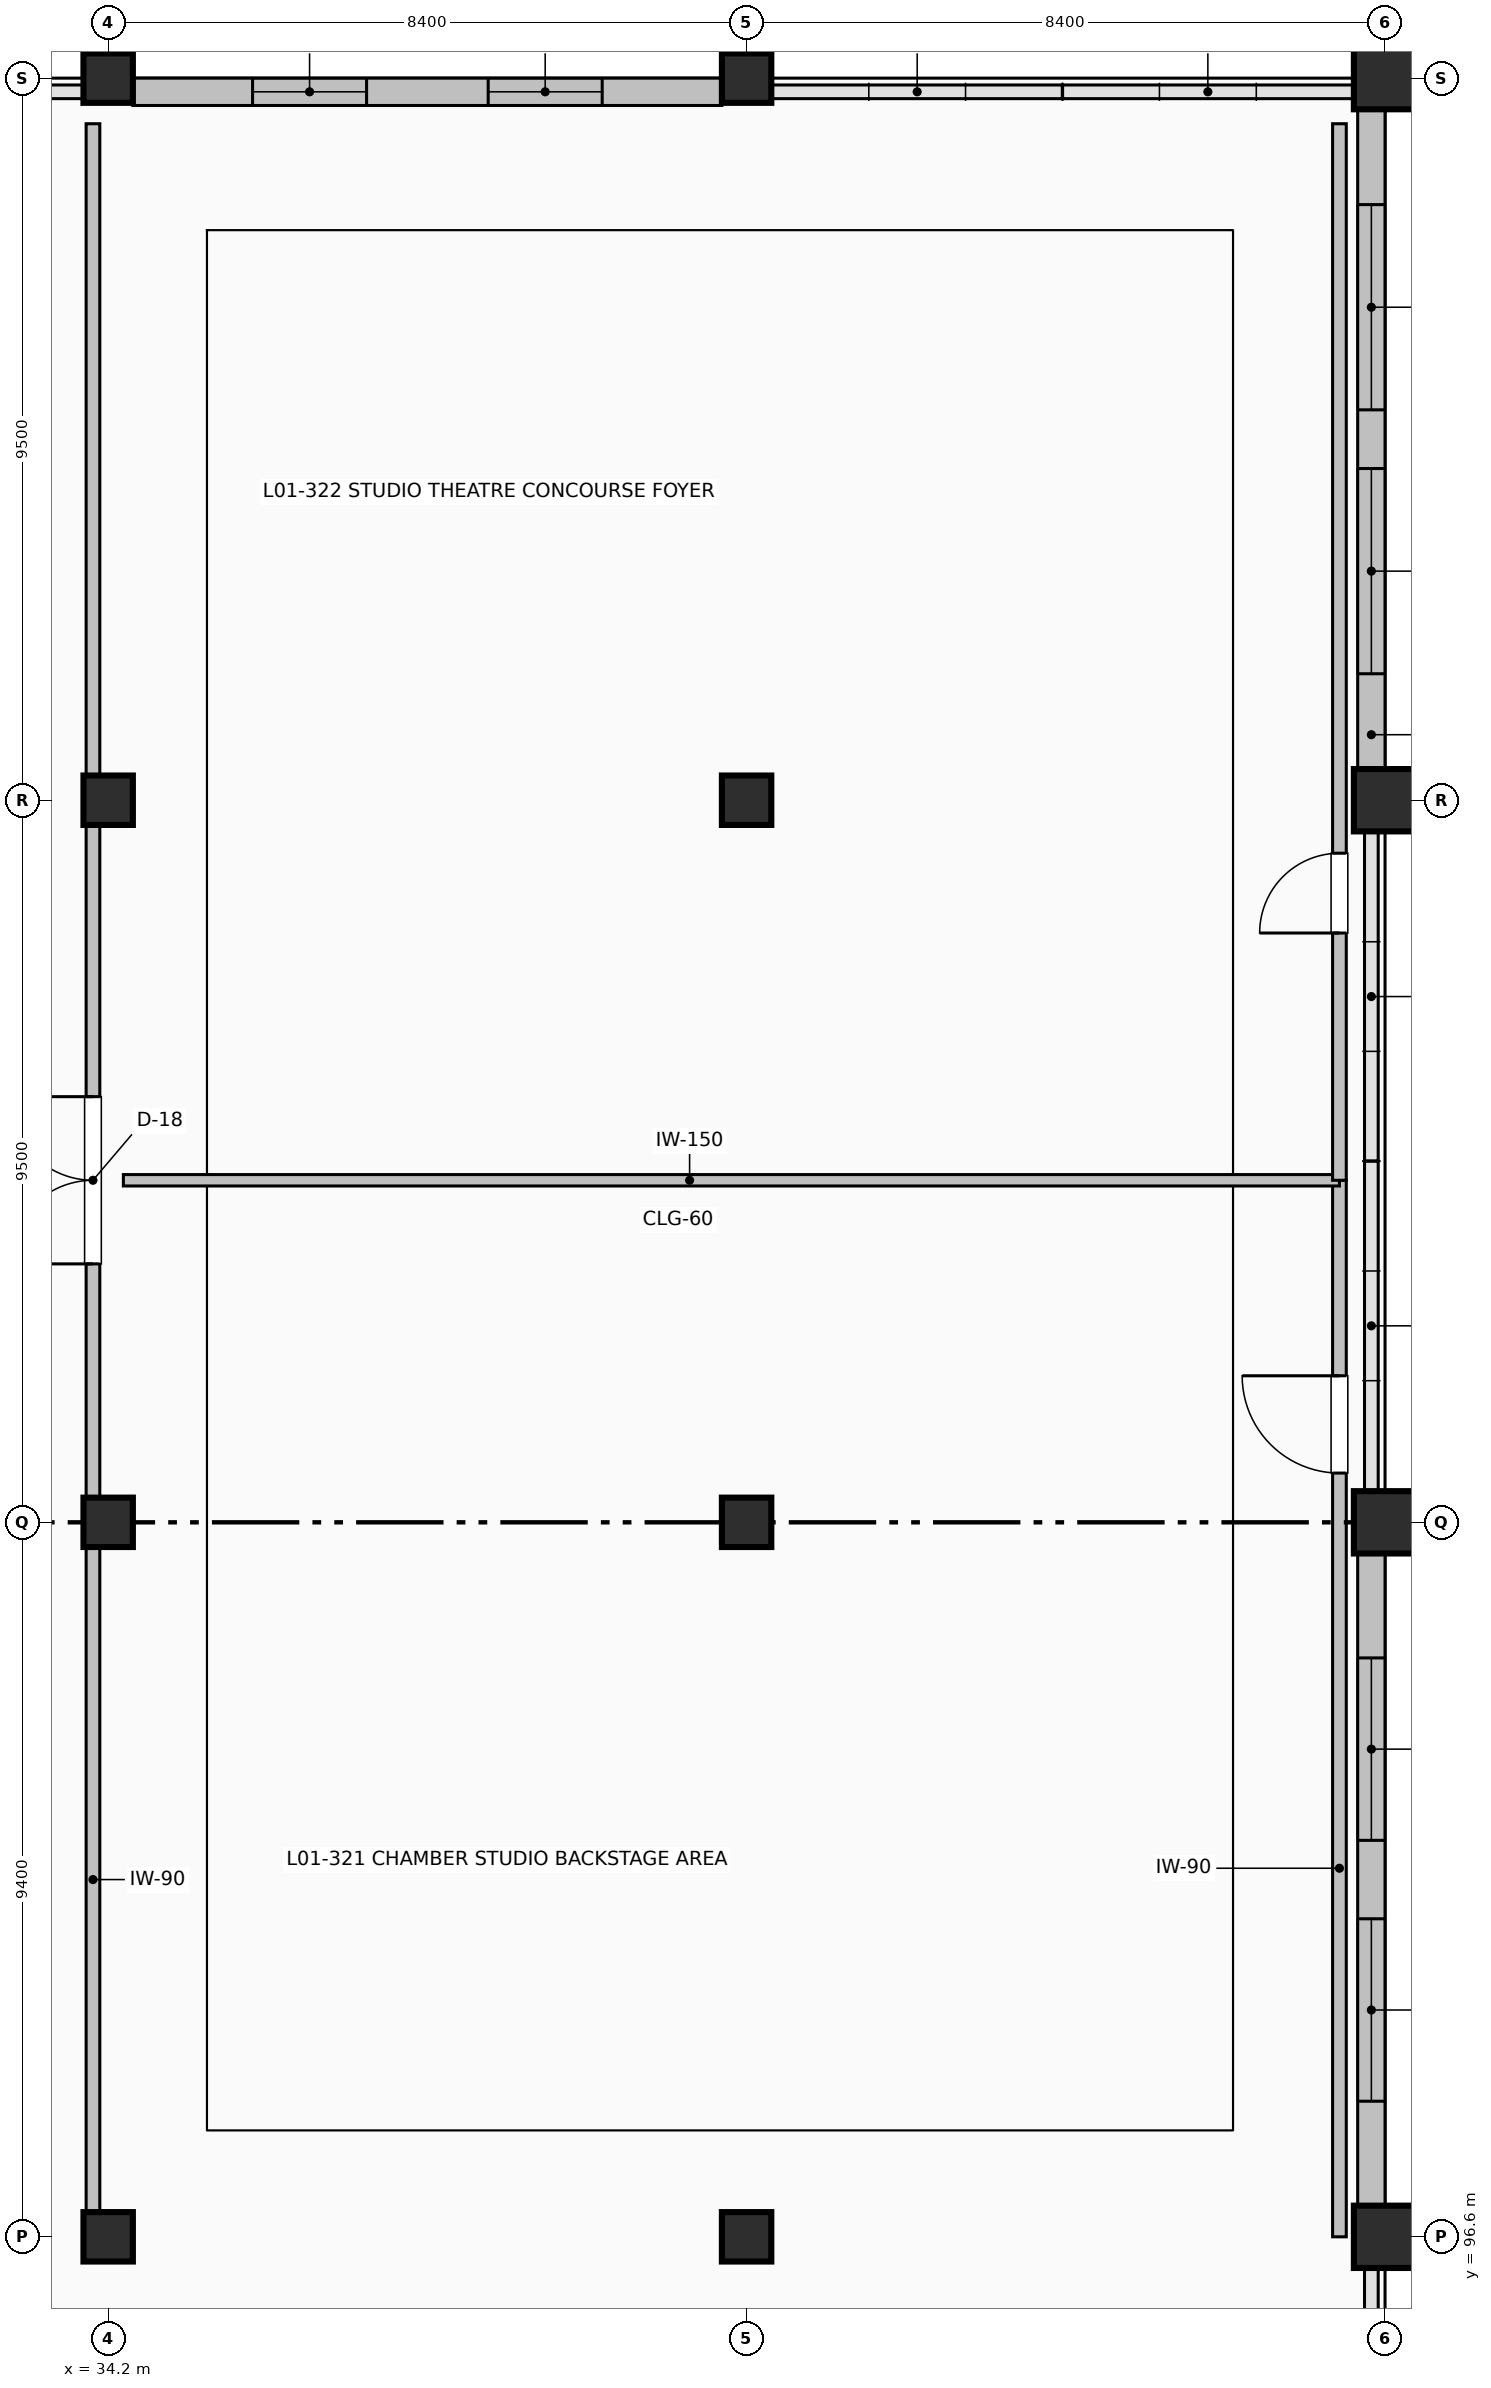
"""IFC4 building model, lengths in metres.
Left out: names, types, materials, properties, quantities, classifications, styles, units other than length and angle.
Written with IfcOpenShell. Run it as: python <this file> out.ifc"""

import sys

from ifc_helpers import new_model, si_unit, direction, frame, frame_2d, origin, origin_2d, place, context, subcontext, project, spatial, rectangle, extrude, element, fill, save


model = new_model("IFC4")
c1 = context("Model", 3, precision=1e-05, world=origin(), true_north=direction((0.0, 1.0)))
c2 = subcontext(c1, "Body", "Model", "MODEL_VIEW")
j1 = project(units=[si_unit("LENGTHUNIT", "METRE"), si_unit("PLANEANGLEUNIT", "RADIAN")], contexts=[c1])
p1 = place(None, origin())
s1 = spatial("IfcSite", under=j1, at=p1, CompositionType="ELEMENT")
p2 = place(p1, origin())
s2 = spatial("IfcBuilding", under=s1, at=p2, CompositionType="ELEMENT")
p3 = place(p2, frame((0.0, 0.0, 5.4)))
s3 = spatial("IfcBuildingStorey", under=s2, at=p3, CompositionType="ELEMENT", Elevation=5.4)
for number, where, z_axis, x_axis in (
    (1, (34.2, 96.6, 0.0), (0.0, 0.0, 1.0), (1.0, 0.0, 0.0)),
    (2, (34.2, 106.0, 0.0), (0.0, 0.0, 1.0), (1.0, 0.0, 0.0)),
    (3, (34.2, 115.5, 0.0), (0.0, 0.0, 1.0), (1.0, 0.0, 0.0)),
    (4, (34.2, 125.0, 0.0), (0.0, 0.0, 1.0), (1.0, 0.0, 0.0)),
    (5, (42.6, 96.6, 0.0), (0.0, 0.0, 1.0), (1.0, 0.0, 0.0)),
    (6, (42.6, 106.0, 0.0), (0.0, 0.0, 1.0), (1.0, 0.0, 0.0)),
    (7, (42.6, 115.5, 0.0), (0.0, 0.0, 1.0), (1.0, 0.0, 0.0)),
    (8, (42.6, 125.0, 0.0), (0.0, 0.0, 1.0), (1.0, 0.0, 0.0)),
):
    element("IfcColumn", number, at=place(p3, frame(where, z_axis=z_axis, x_axis=x_axis)), inside=s3, PredefinedType="COLUMN", context=c2, shape_type="SweptSolid", body=[
        extrude(rectangle(XDim=0.65, YDim=0.65, at=origin_2d()), origin(), (0.0, 0.0, 1.0), 4.8),
    ])
for number, where, z_axis, x_axis in (
    (9, (51.0, 96.6, 0.0), (0.0, 0.0, 1.0), (1.0, 0.0, 0.0)),
    (10, (51.0, 106.0, 0.0), (0.0, 0.0, 1.0), (1.0, 0.0, 0.0)),
    (11, (51.0, 115.5, 0.0), (0.0, 0.0, 1.0), (1.0, 0.0, 0.0)),
    (12, (51.0, 125.0, 0.0), (0.0, 0.0, 1.0), (1.0, 0.0, 0.0)),
):
    element("IfcColumn", number, at=place(p3, frame(where, z_axis=z_axis, x_axis=x_axis)), inside=s3, PredefinedType="COLUMN", context=c2, shape_type="SweptSolid", body=[
        extrude(rectangle(XDim=0.82, YDim=0.82, at=origin_2d()), origin(), (0.0, 0.0, 1.0), 4.8),
    ])
p4 = place(p3, frame((50.82, 124.59, 0.0), z_axis=(0.0, 0.0, 1.0), x_axis=(0.0, -1.0, 0.0)))
e13 = element("IfcWall", 13, at=p4, inside=s3, PredefinedType="SOLIDWALL", context=c2, shape_type="SweptSolid", body=[
    extrude(rectangle(XDim=8.68, YDim=0.36, at=frame_2d((4.34, 0.0))), origin(), (0.0, 0.0, 1.0), 3.592),
])
p5 = place(p4, frame((1.254, 0.0, 0.9)))
e14 = element("IfcOpeningElement", 14, at=p5, cuts=e13, PredefinedType="OPENING", context=c2, shape_type="SweptSolid", body=[
    extrude(rectangle(XDim=2.7, YDim=2.1, at=frame_2d((1.35, 1.05))), frame((0.0, 0.19, 0.0), z_axis=(0.0, -1.0, 0.0), x_axis=(1.0, 0.0, 0.0)), (0.0, 0.0, 1.0), 0.38),
])
p6 = place(p4, frame((4.726, 0.0, 0.9)))
e15 = element("IfcOpeningElement", 15, at=p6, cuts=e13, PredefinedType="OPENING", context=c2, shape_type="SweptSolid", body=[
    extrude(rectangle(XDim=2.7, YDim=2.1, at=frame_2d((1.35, 1.05))), frame((0.0, 0.19, 0.0), z_axis=(0.0, -1.0, 0.0), x_axis=(1.0, 0.0, 0.0)), (0.0, 0.0, 1.0), 0.38),
])
p7 = place(p3, frame((50.82, 105.59, 0.0), z_axis=(0.0, 0.0, 1.0), x_axis=(0.0, -1.0, 0.0)))
e16 = element("IfcWall", 16, at=p7, inside=s3, PredefinedType="SOLIDWALL", context=c2, shape_type="SweptSolid", body=[
    extrude(rectangle(XDim=8.58, YDim=0.36, at=frame_2d((4.29, 0.0))), origin(), (0.0, 0.0, 1.0), 3.592),
])
p8 = place(p7, frame((1.374, 0.0, 0.9)))
e17 = element("IfcOpeningElement", 17, at=p8, cuts=e16, PredefinedType="OPENING", context=c2, shape_type="SweptSolid", body=[
    extrude(rectangle(XDim=2.4, YDim=2.1, at=frame_2d((1.2, 1.05))), frame((0.0, 0.19, 0.0), z_axis=(0.0, -1.0, 0.0), x_axis=(1.0, 0.0, 0.0)), (0.0, 0.0, 1.0), 0.38),
])
p9 = place(p7, frame((4.806, 0.0, 0.9)))
e18 = element("IfcOpeningElement", 18, at=p9, cuts=e16, PredefinedType="OPENING", context=c2, shape_type="SweptSolid", body=[
    extrude(rectangle(XDim=2.4, YDim=2.1, at=frame_2d((1.2, 1.05))), frame((0.0, 0.19, 0.0), z_axis=(0.0, -1.0, 0.0), x_axis=(1.0, 0.0, 0.0)), (0.0, 0.0, 1.0), 0.38),
])
p10 = place(p3, frame((34.525, 124.82, 0.0), z_axis=(0.0, 0.0, 1.0), x_axis=(1.0, 0.0, 0.0)))
e19 = element("IfcWall", 19, at=p10, inside=s3, PredefinedType="SOLIDWALL", context=c2, shape_type="SweptSolid", body=[
    extrude(rectangle(XDim=7.75, YDim=0.36, at=frame_2d((3.875, 0.0))), origin(), (0.0, 0.0, 1.0), 3.592),
])
p11 = place(p10, frame((1.575, 0.0, 0.9)))
e20 = element("IfcOpeningElement", 20, at=p11, cuts=e19, PredefinedType="OPENING", context=c2, shape_type="SweptSolid", body=[
    extrude(rectangle(XDim=1.5, YDim=2.1, at=frame_2d((0.75, 1.05))), frame((0.0, 0.19, 0.0), z_axis=(0.0, -1.0, 0.0), x_axis=(1.0, 0.0, 0.0)), (0.0, 0.0, 1.0), 0.38),
])
p12 = place(p10, frame((4.675, 0.0, 0.9)))
e21 = element("IfcOpeningElement", 21, at=p12, cuts=e19, PredefinedType="OPENING", context=c2, shape_type="SweptSolid", body=[
    extrude(rectangle(XDim=1.5, YDim=2.1, at=frame_2d((0.75, 1.05))), frame((0.0, 0.19, 0.0), z_axis=(0.0, -1.0, 0.0), x_axis=(1.0, 0.0, 0.0)), (0.0, 0.0, 1.0), 0.38),
])
p13 = place(p3, frame((34.0, 96.925, 0.0), z_axis=(0.0, 0.0, 1.0), x_axis=(0.0, 1.0, 0.0)))
e22 = element("IfcWall", 22, at=p13, inside=s3, PredefinedType="PARTITIONING", context=c2, shape_type="SweptSolid", body=[
    extrude(rectangle(XDim=8.75, YDim=0.18, at=frame_2d((4.375, 0.0))), origin(), (0.0, 0.0, 1.0), 3.592),
])
p14 = place(p3, frame((34.0, 106.325, 0.0), z_axis=(0.0, 0.0, 1.0), x_axis=(0.0, 1.0, 0.0)))
e23 = element("IfcWall", 23, at=p14, inside=s3, PredefinedType="PARTITIONING", context=c2, shape_type="SweptSolid", body=[
    extrude(rectangle(XDim=8.85, YDim=0.18, at=frame_2d((4.425, 0.0))), origin(), (0.0, 0.0, 1.0), 3.592),
])
p15 = place(p14, frame((3.075, 0.0, 0.0)))
e24 = element("IfcOpeningElement", 24, at=p15, cuts=e23, PredefinedType="OPENING", context=c2, shape_type="SweptSolid", body=[
    extrude(rectangle(XDim=2.2, YDim=2.32, at=frame_2d((1.1, 1.16))), frame((0.0, 0.1, 0.0), z_axis=(0.0, -1.0, 0.0), x_axis=(1.0, 0.0, 0.0)), (0.0, 0.0, 1.0), 0.2),
])
p16 = place(p3, frame((34.0, 115.825, 0.0), z_axis=(0.0, 0.0, 1.0), x_axis=(0.0, 1.0, 0.0)))
e25 = element("IfcWall", 25, at=p16, inside=s3, PredefinedType="PARTITIONING", context=c2, shape_type="SweptSolid", body=[
    extrude(rectangle(XDim=8.575, YDim=0.18, at=frame_2d((4.288, 0.0))), origin(), (0.0, 0.0, 1.0), 3.592),
])
p17 = place(p3, frame((50.4, 96.6, 0.0), z_axis=(0.0, 0.0, 1.0), x_axis=(0.0, 1.0, 0.0)))
e26 = element("IfcWall", 26, at=p17, inside=s3, PredefinedType="PARTITIONING", context=c2, shape_type="SweptSolid", body=[
    extrude(rectangle(XDim=13.9, YDim=0.18, at=frame_2d((6.95, 0.0))), origin(), (0.0, 0.0, 1.0), 4.492),
])
p18 = place(p17, frame((10.048, 0.0, 0.0)))
e27 = element("IfcOpeningElement", 27, at=p18, cuts=e26, PredefinedType="OPENING", context=c2, shape_type="SweptSolid", body=[
    extrude(rectangle(XDim=1.28, YDim=2.14, at=frame_2d((0.64, 1.07))), frame((0.0, 0.1, 0.0), z_axis=(0.0, -1.0, 0.0), x_axis=(1.0, 0.0, 0.0)), (0.0, 0.0, 1.0), 0.2),
])
p19 = place(p3, frame((34.4, 110.5, 0.0), z_axis=(0.0, 0.0, 1.0), x_axis=(1.0, 0.0, 0.0)))
e28 = element("IfcWall", 28, at=p19, inside=s3, PredefinedType="PARTITIONING", context=c2, shape_type="SweptSolid", body=[
    extrude(rectangle(XDim=16.0, YDim=0.15, at=frame_2d((8.0, 0.0))), origin(), (0.0, 0.0, 1.0), 4.492),
])
p20 = place(p3, frame((50.4, 110.5, 0.0), z_axis=(0.0, 0.0, 1.0), x_axis=(0.0, 1.0, 0.0)))
e29 = element("IfcWall", 29, at=p20, inside=s3, PredefinedType="PARTITIONING", context=c2, shape_type="SweptSolid", body=[
    extrude(rectangle(XDim=13.9, YDim=0.18, at=frame_2d((6.95, 0.0))), origin(), (0.0, 0.0, 1.0), 4.492),
])
p21 = place(p20, frame((3.253, 0.0, 0.0)))
e30 = element("IfcOpeningElement", 30, at=p21, cuts=e29, PredefinedType="OPENING", context=c2, shape_type="SweptSolid", body=[
    extrude(rectangle(XDim=1.05, YDim=2.1, at=frame_2d((0.525, 1.05))), frame((0.0, 0.1, 0.0), z_axis=(0.0, -1.0, 0.0), x_axis=(1.0, 0.0, 0.0)), (0.0, 0.0, 1.0), 0.2),
])
p22 = place(p5, origin())
e31 = element("IfcWindow", 31, at=p22, inside=s3, PartitioningType="SINGLE_PANEL", PredefinedType="WINDOW", context=c2, shape_type="SweptSolid", body=[
    extrude(rectangle(XDim=2.7, YDim=2.1, at=frame_2d((1.35, 1.05))), frame((0.0, 0.03, 0.0), z_axis=(0.0, -1.0, 0.0), x_axis=(1.0, 0.0, 0.0)), (0.0, 0.0, 1.0), 0.06),
])
fill(e14, e31)
p23 = place(p6, origin())
e32 = element("IfcWindow", 32, at=p23, inside=s3, PartitioningType="SINGLE_PANEL", PredefinedType="WINDOW", context=c2, shape_type="SweptSolid", body=[
    extrude(rectangle(XDim=2.7, YDim=2.1, at=frame_2d((1.35, 1.05))), frame((0.0, 0.03, 0.0), z_axis=(0.0, -1.0, 0.0), x_axis=(1.0, 0.0, 0.0)), (0.0, 0.0, 1.0), 0.06),
])
fill(e15, e32)
p24 = place(p8, origin())
e33 = element("IfcWindow", 33, at=p24, inside=s3, PartitioningType="SINGLE_PANEL", PredefinedType="WINDOW", context=c2, shape_type="SweptSolid", body=[
    extrude(rectangle(XDim=2.4, YDim=2.1, at=frame_2d((1.2, 1.05))), frame((0.0, 0.03, 0.0), z_axis=(0.0, -1.0, 0.0), x_axis=(1.0, 0.0, 0.0)), (0.0, 0.0, 1.0), 0.06),
])
fill(e17, e33)
p25 = place(p9, origin())
e34 = element("IfcWindow", 34, at=p25, inside=s3, PartitioningType="SINGLE_PANEL", PredefinedType="WINDOW", context=c2, shape_type="SweptSolid", body=[
    extrude(rectangle(XDim=2.4, YDim=2.1, at=frame_2d((1.2, 1.05))), frame((0.0, 0.03, 0.0), z_axis=(0.0, -1.0, 0.0), x_axis=(1.0, 0.0, 0.0)), (0.0, 0.0, 1.0), 0.06),
])
fill(e18, e34)
p26 = place(p11, origin())
e35 = element("IfcWindow", 35, at=p26, inside=s3, PartitioningType="SINGLE_PANEL", PredefinedType="WINDOW", context=c2, shape_type="SweptSolid", body=[
    extrude(rectangle(XDim=1.5, YDim=2.1, at=frame_2d((0.75, 1.05))), frame((0.0, 0.03, 0.0), z_axis=(0.0, -1.0, 0.0), x_axis=(1.0, 0.0, 0.0)), (0.0, 0.0, 1.0), 0.06),
])
fill(e20, e35)
p27 = place(p12, origin())
e36 = element("IfcWindow", 36, at=p27, inside=s3, PartitioningType="SINGLE_PANEL", PredefinedType="WINDOW", context=c2, shape_type="SweptSolid", body=[
    extrude(rectangle(XDim=1.5, YDim=2.1, at=frame_2d((0.75, 1.05))), frame((0.0, 0.03, 0.0), z_axis=(0.0, -1.0, 0.0), x_axis=(1.0, 0.0, 0.0)), (0.0, 0.0, 1.0), 0.06),
])
fill(e21, e36)
p28 = place(p15, origin())
e37 = element("IfcDoor", 37, at=p28, inside=s3, OperationType="DOUBLE_DOOR_SINGLE_SWING", PredefinedType="DOOR", context=c2, shape_type="SweptSolid", body=[
    extrude(rectangle(XDim=2.2, YDim=2.32, at=frame_2d((1.1, 1.16))), frame((0.0, 0.025, 0.0), z_axis=(0.0, -1.0, 0.0), x_axis=(1.0, 0.0, 0.0)), (0.0, 0.0, 1.0), 0.05),
])
fill(e24, e37)
p29 = place(p18, origin())
e38 = element("IfcDoor", 38, at=p29, inside=s3, OperationType="SINGLE_SWING_RIGHT", PredefinedType="DOOR", context=c2, shape_type="SweptSolid", body=[
    extrude(rectangle(XDim=1.28, YDim=2.14, at=frame_2d((0.64, 1.07))), frame((0.0, 0.025, 0.0), z_axis=(0.0, -1.0, 0.0), x_axis=(1.0, 0.0, 0.0)), (0.0, 0.0, 1.0), 0.05),
])
fill(e27, e38)
p30 = place(p21, origin())
e39 = element("IfcDoor", 39, at=p30, inside=s3, OperationType="SINGLE_SWING_LEFT", PredefinedType="DOOR", context=c2, shape_type="SweptSolid", body=[
    extrude(rectangle(XDim=1.05, YDim=2.1, at=frame_2d((0.525, 1.05))), frame((0.0, 0.025, 0.0), z_axis=(0.0, -1.0, 0.0), x_axis=(1.0, 0.0, 0.0)), (0.0, 0.0, 1.0), 0.05),
])
fill(e30, e39)
save(model, sys.argv[1])
